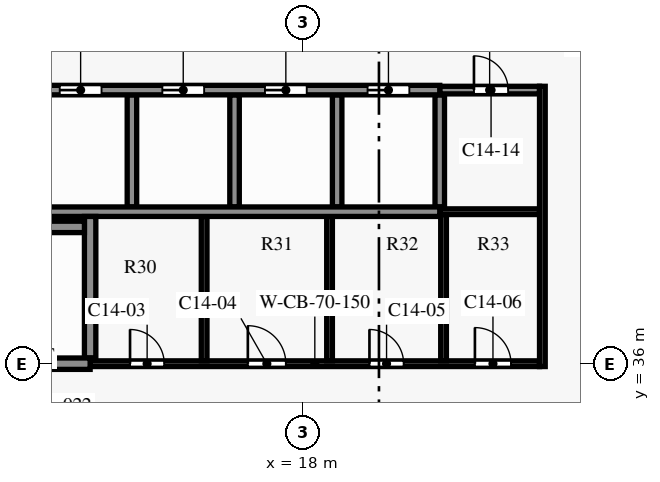
"""IFC4 building model, lengths in metres.
Left out: names, types, materials, properties, quantities, classifications, styles, units other than length and angle.
Written with IfcOpenShell. Run it as: python <this file> out.ifc"""

import sys

from ifc_helpers import new_model, si_unit, direction, frame, frame_2d, origin, place, context, subcontext, project, spatial, rectangle, extrude, element, fill, save


model = new_model("IFC4")
c1 = context("Model", 3, precision=1e-05, world=origin(), true_north=direction((0.0, 1.0)))
c2 = subcontext(c1, "Body", "Model", "MODEL_VIEW")
j1 = project(units=[si_unit("LENGTHUNIT", "METRE"), si_unit("PLANEANGLEUNIT", "RADIAN")], contexts=[c1])
p1 = place(None, origin())
s1 = spatial("IfcSite", under=j1, at=p1, CompositionType="ELEMENT")
p2 = place(p1, origin())
s2 = spatial("IfcBuilding", under=s1, at=p2, CompositionType="ELEMENT")
p3 = place(p2, frame((0.0, 0.0, 88.5)))
s3 = spatial("IfcBuildingStorey", under=s2, at=p3, CompositionType="ELEMENT", Elevation=88.5)
p4 = place(p3, frame((12.4, 36.0, 0.0), z_axis=(0.0, 0.0, 1.0), x_axis=(1.0, 0.0, 0.0)))
e1 = element("IfcWall", 1, at=p4, inside=s3, PredefinedType="SHEAR", context=c2, shape_type="SweptSolid", body=[
    extrude(rectangle(XDim=11.825, YDim=0.15, at=frame_2d((5.913, 0.0))), origin(), (0.0, 0.0, 1.0), 3.5),
])
p5 = place(p4, frame((1.05, 0.0, 0.0)))
e2 = element("IfcOpeningElement", 2, at=p5, cuts=e1, PredefinedType="OPENING", context=c2, shape_type="SweptSolid", body=[
    extrude(rectangle(XDim=0.9, YDim=2.1, at=frame_2d((0.45, 1.05))), frame((0.0, 0.085, 0.0), z_axis=(0.0, -1.0, 0.0), x_axis=(1.0, 0.0, 0.0)), (0.0, 0.0, 1.0), 0.17),
])
p6 = place(p4, frame((4.15, 0.0, 0.0)))
e3 = element("IfcOpeningElement", 3, at=p6, cuts=e1, PredefinedType="OPENING", context=c2, shape_type="SweptSolid", body=[
    extrude(rectangle(XDim=1.0, YDim=2.1, at=frame_2d((0.5, 1.05))), frame((0.0, 0.085, 0.0), z_axis=(0.0, -1.0, 0.0), x_axis=(1.0, 0.0, 0.0)), (0.0, 0.0, 1.0), 0.17),
])
p7 = place(p4, frame((7.35, 0.0, 0.0)))
e4 = element("IfcOpeningElement", 4, at=p7, cuts=e1, PredefinedType="OPENING", context=c2, shape_type="SweptSolid", body=[
    extrude(rectangle(XDim=0.9, YDim=2.1, at=frame_2d((0.45, 1.05))), frame((0.0, 0.085, 0.0), z_axis=(0.0, -1.0, 0.0), x_axis=(1.0, 0.0, 0.0)), (0.0, 0.0, 1.0), 0.17),
])
p8 = place(p4, frame((10.125, 0.0, 0.0)))
e5 = element("IfcOpeningElement", 5, at=p8, cuts=e1, PredefinedType="OPENING", context=c2, shape_type="SweptSolid", body=[
    extrude(rectangle(XDim=0.95, YDim=2.1, at=frame_2d((0.475, 1.05))), frame((0.0, 0.085, 0.0), z_axis=(0.0, -1.0, 0.0), x_axis=(1.0, 0.0, 0.0)), (0.0, 0.0, 1.0), 0.17),
])
p9 = place(p3, frame((4.4, 36.0, 0.0), z_axis=(0.0, 0.0, 1.0), x_axis=(1.0, 0.0, 0.0)))
e6 = element("IfcWall", 6, at=p9, inside=s3, PredefinedType="SHEAR", context=c2, shape_type="SweptSolid", body=[
    extrude(rectangle(XDim=8.0, YDim=0.3, at=frame_2d((4.0, 0.0))), origin(), (0.0, 0.0, 1.0), 3.5),
])
p10 = place(p9, frame((0.3, 0.0, 0.0)))
e7 = element("IfcOpeningElement", 7, at=p10, cuts=e6, PredefinedType="OPENING", context=c2, shape_type="SweptSolid", body=[
    extrude(rectangle(XDim=1.5, YDim=2.2, at=frame_2d((0.75, 1.1))), frame((0.0, 0.16, 0.0), z_axis=(0.0, -1.0, 0.0), x_axis=(1.0, 0.0, 0.0)), (0.0, 0.0, 1.0), 0.32),
])
p11 = place(p3, frame((4.55, 39.6, 0.0), z_axis=(0.0, 0.0, 1.0), x_axis=(1.0, 0.0, 0.0)))
e8 = element("IfcWall", 8, at=p11, inside=s3, PredefinedType="SHEAR", context=c2, shape_type="SweptSolid", body=[
    extrude(rectangle(XDim=7.7, YDim=0.3, at=frame_2d((3.85, 0.0))), origin(), (0.0, 0.0, 1.0), 3.5),
])
p12 = place(p3, frame((21.6, 40.0, 0.0), z_axis=(0.0, 0.0, 1.0), x_axis=(1.0, 0.0, 0.0)))
e9 = element("IfcWall", 9, at=p12, inside=s3, PredefinedType="PARTITIONING", context=c2, shape_type="SweptSolid", body=[
    extrude(rectangle(XDim=2.625, YDim=0.15, at=frame_2d((1.312, 0.0))), origin(), (0.0, 0.0, 1.0), 3.5),
])
p13 = place(p3, frame((8.1, 40.0, 0.0), z_axis=(0.0, 0.0, 1.0), x_axis=(1.0, 0.0, 0.0)))
e10 = element("IfcWall", 10, at=p13, inside=s3, PredefinedType="SHEAR", context=c2, shape_type="SweptSolid", body=[
    extrude(rectangle(XDim=13.5, YDim=0.25, at=frame_2d((6.75, 0.0))), origin(), (0.0, 0.0, 1.0), 3.5),
])
p14 = place(p3, frame((21.6, 43.2, 0.0), z_axis=(0.0, 0.0, 1.0), x_axis=(1.0, 0.0, 0.0)))
e11 = element("IfcWall", 11, at=p14, inside=s3, PredefinedType="PARTITIONING", context=c2, shape_type="SweptSolid", body=[
    extrude(rectangle(XDim=2.625, YDim=0.2, at=frame_2d((1.312, 0.0))), origin(), (0.0, 0.0, 1.0), 3.5),
])
p15 = place(p14, frame((0.9, 0.0, 0.0)))
e12 = element("IfcOpeningElement", 12, at=p15, cuts=e11, PredefinedType="OPENING", context=c2, shape_type="SweptSolid", body=[
    extrude(rectangle(XDim=0.9, YDim=2.1, at=frame_2d((0.45, 1.05))), frame((0.0, 0.11, 0.0), z_axis=(0.0, -1.0, 0.0), x_axis=(1.0, 0.0, 0.0)), (0.0, 0.0, 1.0), 0.22),
])
p16 = place(p3, frame((8.1, 43.2, 0.0), z_axis=(0.0, 0.0, 1.0), x_axis=(1.0, 0.0, 0.0)))
e13 = element("IfcWall", 13, at=p16, inside=s3, PredefinedType="SHEAR", context=c2, shape_type="SweptSolid", body=[
    extrude(rectangle(XDim=13.5, YDim=0.25, at=frame_2d((6.75, 0.0))), origin(), (0.0, 0.0, 1.0), 3.5),
])
p17 = place(p16, frame((0.8, 0.0, 0.0)))
e14 = element("IfcOpeningElement", 14, at=p17, cuts=e13, PredefinedType="OPENING", context=c2, shape_type="SweptSolid", body=[
    extrude(rectangle(XDim=1.1, YDim=2.1, at=frame_2d((0.55, 1.05))), frame((0.0, 0.135, 0.0), z_axis=(0.0, -1.0, 0.0), x_axis=(1.0, 0.0, 0.0)), (0.0, 0.0, 1.0), 0.27),
])
p18 = place(p16, frame((3.5, 0.0, 0.0)))
e15 = element("IfcOpeningElement", 15, at=p18, cuts=e13, PredefinedType="OPENING", context=c2, shape_type="SweptSolid", body=[
    extrude(rectangle(XDim=1.1, YDim=2.1, at=frame_2d((0.55, 1.05))), frame((0.0, 0.135, 0.0), z_axis=(0.0, -1.0, 0.0), x_axis=(1.0, 0.0, 0.0)), (0.0, 0.0, 1.0), 0.27),
])
p19 = place(p16, frame((6.2, 0.0, 0.0)))
e16 = element("IfcOpeningElement", 16, at=p19, cuts=e13, PredefinedType="OPENING", context=c2, shape_type="SweptSolid", body=[
    extrude(rectangle(XDim=1.1, YDim=2.1, at=frame_2d((0.55, 1.05))), frame((0.0, 0.135, 0.0), z_axis=(0.0, -1.0, 0.0), x_axis=(1.0, 0.0, 0.0)), (0.0, 0.0, 1.0), 0.27),
])
p20 = place(p16, frame((8.9, 0.0, 0.0)))
e17 = element("IfcOpeningElement", 17, at=p20, cuts=e13, PredefinedType="OPENING", context=c2, shape_type="SweptSolid", body=[
    extrude(rectangle(XDim=1.1, YDim=2.1, at=frame_2d((0.55, 1.05))), frame((0.0, 0.135, 0.0), z_axis=(0.0, -1.0, 0.0), x_axis=(1.0, 0.0, 0.0)), (0.0, 0.0, 1.0), 0.27),
])
p21 = place(p16, frame((11.6, 0.0, 0.0)))
e18 = element("IfcOpeningElement", 18, at=p21, cuts=e13, PredefinedType="OPENING", context=c2, shape_type="SweptSolid", body=[
    extrude(rectangle(XDim=1.1, YDim=2.1, at=frame_2d((0.55, 1.05))), frame((0.0, 0.135, 0.0), z_axis=(0.0, -1.0, 0.0), x_axis=(1.0, 0.0, 0.0)), (0.0, 0.0, 1.0), 0.27),
])
p22 = place(p3, frame((12.4, 36.15, 0.0), z_axis=(0.0, 0.0, 1.0), x_axis=(0.0, 1.0, 0.0)))
e19 = element("IfcWall", 19, at=p22, inside=s3, PredefinedType="SHEAR", context=c2, shape_type="SweptSolid", body=[
    extrude(rectangle(XDim=3.725, YDim=0.3, at=frame_2d((1.863, 0.0))), origin(), (0.0, 0.0, 1.0), 3.5),
])
p23 = place(p3, frame((13.5, 40.125, 0.0), z_axis=(0.0, 0.0, 1.0), x_axis=(0.0, 1.0, 0.0)))
e20 = element("IfcWall", 20, at=p23, inside=s3, PredefinedType="SHEAR", context=c2, shape_type="SweptSolid", body=[
    extrude(rectangle(XDim=2.95, YDim=0.25, at=frame_2d((1.475, 0.0))), origin(), (0.0, 0.0, 1.0), 3.5),
])
p24 = place(p3, frame((15.4, 36.075, 0.0), z_axis=(0.0, 0.0, 1.0), x_axis=(0.0, 1.0, 0.0)))
e21 = element("IfcWall", 21, at=p24, inside=s3, PredefinedType="PARTITIONING", context=c2, shape_type="SweptSolid", body=[
    extrude(rectangle(XDim=3.8, YDim=0.15, at=frame_2d((1.9, 0.0))), origin(), (0.0, 0.0, 1.0), 3.5),
])
p25 = place(p3, frame((16.2, 40.125, 0.0), z_axis=(0.0, 0.0, 1.0), x_axis=(0.0, 1.0, 0.0)))
e22 = element("IfcWall", 22, at=p25, inside=s3, PredefinedType="SHEAR", context=c2, shape_type="SweptSolid", body=[
    extrude(rectangle(XDim=2.95, YDim=0.25, at=frame_2d((1.475, 0.0))), origin(), (0.0, 0.0, 1.0), 3.5),
])
p26 = place(p3, frame((18.7, 36.075, 0.0), z_axis=(0.0, 0.0, 1.0), x_axis=(0.0, 1.0, 0.0)))
e23 = element("IfcWall", 23, at=p26, inside=s3, PredefinedType="PARTITIONING", context=c2, shape_type="SweptSolid", body=[
    extrude(rectangle(XDim=3.8, YDim=0.15, at=frame_2d((1.9, 0.0))), origin(), (0.0, 0.0, 1.0), 3.5),
])
for number, where, z_axis, x_axis in (
    (24, (18.9, 40.125, 0.0), (0.0, 0.0, 1.0), (0.0, 1.0, 0.0)),
    (25, (21.6, 40.125, 0.0), (0.0, 0.0, 1.0), (0.0, 1.0, 0.0)),
):
    element("IfcWall", number, at=place(p3, frame(where, z_axis=z_axis, x_axis=x_axis)), inside=s3, PredefinedType="SHEAR", context=c2, shape_type="SweptSolid", body=[
        extrude(rectangle(XDim=2.95, YDim=0.25, at=frame_2d((1.475, 0.0))), origin(), (0.0, 0.0, 1.0), 3.5),
    ])
p27 = place(p3, frame((21.7, 36.075, 0.0), z_axis=(0.0, 0.0, 1.0), x_axis=(0.0, 1.0, 0.0)))
e26 = element("IfcWall", 26, at=p27, inside=s3, PredefinedType="PARTITIONING", context=c2, shape_type="SweptSolid", body=[
    extrude(rectangle(XDim=3.85, YDim=0.15, at=frame_2d((1.925, 0.0))), origin(), (0.0, 0.0, 1.0), 3.5),
])
p28 = place(p3, frame((24.3, 35.925, 0.0), z_axis=(0.0, 0.0, 1.0), x_axis=(0.0, 1.0, 0.0)))
e27 = element("IfcWall", 27, at=p28, inside=s3, PredefinedType="PARTITIONING", context=c2, shape_type="SweptSolid", body=[
    extrude(rectangle(XDim=7.375, YDim=0.15, at=frame_2d((3.688, 0.0))), origin(), (0.0, 0.0, 1.0), 3.5),
])
p29 = place(p5, origin())
e28 = element("IfcDoor", 28, at=p29, inside=s3, OperationType="SINGLE_SWING_RIGHT", PredefinedType="DOOR", context=c2, shape_type="SweptSolid", body=[
    extrude(rectangle(XDim=0.9, YDim=2.1, at=frame_2d((0.45, 1.05))), frame((0.0, 0.025, 0.0), z_axis=(0.0, -1.0, 0.0), x_axis=(1.0, 0.0, 0.0)), (0.0, 0.0, 1.0), 0.05),
])
fill(e2, e28)
p30 = place(p6, origin())
e29 = element("IfcDoor", 29, at=p30, inside=s3, OperationType="SINGLE_SWING_LEFT", PredefinedType="DOOR", context=c2, shape_type="SweptSolid", body=[
    extrude(rectangle(XDim=1.0, YDim=2.1, at=frame_2d((0.5, 1.05))), frame((0.0, 0.025, 0.0), z_axis=(0.0, -1.0, 0.0), x_axis=(1.0, 0.0, 0.0)), (0.0, 0.0, 1.0), 0.05),
])
fill(e3, e29)
p31 = place(p7, origin())
e30 = element("IfcDoor", 30, at=p31, inside=s3, OperationType="SINGLE_SWING_RIGHT", PredefinedType="DOOR", context=c2, shape_type="SweptSolid", body=[
    extrude(rectangle(XDim=0.9, YDim=2.1, at=frame_2d((0.45, 1.05))), frame((0.0, 0.025, 0.0), z_axis=(0.0, -1.0, 0.0), x_axis=(1.0, 0.0, 0.0)), (0.0, 0.0, 1.0), 0.05),
])
fill(e4, e30)
p32 = place(p8, origin())
e31 = element("IfcDoor", 31, at=p32, inside=s3, OperationType="SINGLE_SWING_LEFT", PredefinedType="DOOR", context=c2, shape_type="SweptSolid", body=[
    extrude(rectangle(XDim=0.95, YDim=2.1, at=frame_2d((0.475, 1.05))), frame((0.0, 0.025, 0.0), z_axis=(0.0, -1.0, 0.0), x_axis=(1.0, 0.0, 0.0)), (0.0, 0.0, 1.0), 0.05),
])
fill(e5, e31)
p33 = place(p15, origin())
e32 = element("IfcDoor", 32, at=p33, inside=s3, OperationType="SINGLE_SWING_RIGHT", PredefinedType="DOOR", context=c2, shape_type="SweptSolid", body=[
    extrude(rectangle(XDim=0.9, YDim=2.1, at=frame_2d((0.45, 1.05))), frame((0.0, 0.025, 0.0), z_axis=(0.0, -1.0, 0.0), x_axis=(1.0, 0.0, 0.0)), (0.0, 0.0, 1.0), 0.05),
])
fill(e12, e32)
p34 = place(p18, origin())
e33 = element("IfcDoor", 33, at=p34, inside=s3, OperationType="DOUBLE_DOOR_SLIDING", PredefinedType="DOOR", context=c2, shape_type="SweptSolid", body=[
    extrude(rectangle(XDim=1.1, YDim=2.1, at=frame_2d((0.55, 1.05))), frame((0.0, 0.025, 0.0), z_axis=(0.0, -1.0, 0.0), x_axis=(1.0, 0.0, 0.0)), (0.0, 0.0, 1.0), 0.05),
])
fill(e15, e33)
p35 = place(p19, origin())
e34 = element("IfcDoor", 34, at=p35, inside=s3, OperationType="DOUBLE_DOOR_SLIDING", PredefinedType="DOOR", context=c2, shape_type="SweptSolid", body=[
    extrude(rectangle(XDim=1.1, YDim=2.1, at=frame_2d((0.55, 1.05))), frame((0.0, 0.025, 0.0), z_axis=(0.0, -1.0, 0.0), x_axis=(1.0, 0.0, 0.0)), (0.0, 0.0, 1.0), 0.05),
])
fill(e16, e34)
p36 = place(p20, origin())
e35 = element("IfcDoor", 35, at=p36, inside=s3, OperationType="DOUBLE_DOOR_SLIDING", PredefinedType="DOOR", context=c2, shape_type="SweptSolid", body=[
    extrude(rectangle(XDim=1.1, YDim=2.1, at=frame_2d((0.55, 1.05))), frame((0.0, 0.025, 0.0), z_axis=(0.0, -1.0, 0.0), x_axis=(1.0, 0.0, 0.0)), (0.0, 0.0, 1.0), 0.05),
])
fill(e17, e35)
p37 = place(p21, origin())
e36 = element("IfcDoor", 36, at=p37, inside=s3, OperationType="DOUBLE_DOOR_SLIDING", PredefinedType="DOOR", context=c2, shape_type="SweptSolid", body=[
    extrude(rectangle(XDim=1.1, YDim=2.1, at=frame_2d((0.55, 1.05))), frame((0.0, 0.025, 0.0), z_axis=(0.0, -1.0, 0.0), x_axis=(1.0, 0.0, 0.0)), (0.0, 0.0, 1.0), 0.05),
])
fill(e18, e36)
save(model, sys.argv[1])
